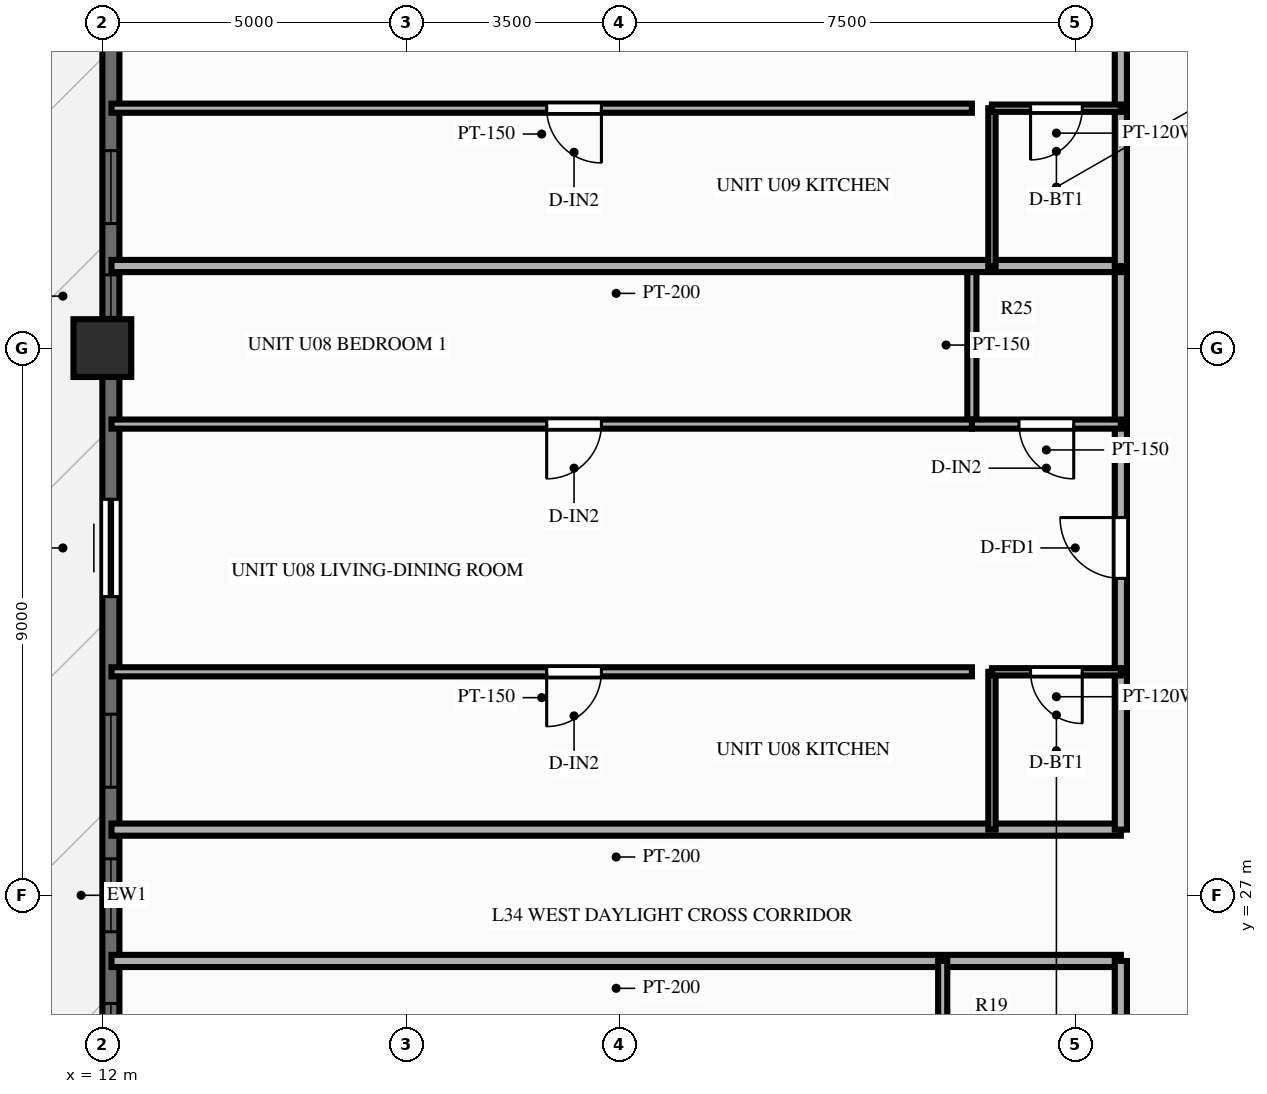
"""IFC4 building model, lengths in metres.
Left out: names, types, materials, properties, quantities, classifications, styles, units other than length and angle.
Written with IfcOpenShell. Run it as: python <this file> out.ifc"""

import sys

from ifc_helpers import new_model, si_unit, direction, frame, frame_2d, origin, origin_2d, place, context, subcontext, project, spatial, rectangle, extrude, source, transform, mapped, element, fill, save


model = new_model("IFC4")
c1 = context("Model", 3, precision=1e-05, world=origin(), true_north=direction((0.0, 1.0)))
c2 = subcontext(c1, "Body", "Model", "MODEL_VIEW")
j1 = project(units=[si_unit("LENGTHUNIT", "METRE"), si_unit("PLANEANGLEUNIT", "RADIAN")], contexts=[c1])
p1 = place(None, origin())
s1 = spatial("IfcSite", under=j1, at=p1, CompositionType="ELEMENT")
p2 = place(p1, origin())
s2 = spatial("IfcBuilding", under=s1, at=p2, CompositionType="ELEMENT")
p3 = place(p2, frame((0.0, 0.0, 107.85)))
s3 = spatial("IfcBuildingStorey", under=s2, at=p3, CompositionType="ELEMENT", Elevation=107.85)
m1 = source(origin(), c2, "Body", "SweptSolid", [
    extrude(rectangle(XDim=0.95, YDim=0.95, at=origin_2d()), origin(), (0.0, 0.0, 1.0), 3.0),
])
p4 = place(p3, frame((12.0, 36.0, 0.0), z_axis=(0.0, 0.0, 1.0), x_axis=(1.0, 0.0, 0.0)))
e1 = element("IfcColumn", 1, at=p4, inside=s3, PredefinedType="COLUMN", context=c2, shape_type="MappedRepresentation", body=[
    mapped(m1, transform((0.0, 0.0, 0.0), scale=1.0)),
])
p5 = place(p3, frame((12.14, 7.2, 0.0), z_axis=(0.0, 0.0, 1.0), x_axis=(0.0, 1.0, 0.0)))
e2 = element("IfcWall", 2, at=p5, inside=s3, PredefinedType="SOLIDWALL", context=c2, shape_type="SweptSolid", body=[
    extrude(rectangle(XDim=39.6, YDim=0.28, at=frame_2d((19.8, 0.0))), origin(), (0.0, 0.0, 1.0), 2.28),
])
p6 = place(p5, frame((0.945, 0.0, 0.25)))
e3 = element("IfcOpeningElement", 3, at=p6, cuts=e2, PredefinedType="OPENING", context=c2, shape_type="SweptSolid", body=[
    extrude(rectangle(XDim=1.2, YDim=1.5, at=frame_2d((0.6, 0.75))), frame((0.0, 0.152, 0.0), z_axis=(0.0, -1.0, 0.0), x_axis=(1.0, 0.0, 0.0)), (0.0, 0.0, 1.0), 0.304),
])
p7 = place(p5, frame((4.213, 0.0, 0.25)))
e4 = element("IfcOpeningElement", 4, at=p7, cuts=e2, PredefinedType="OPENING", context=c2, shape_type="SweptSolid", body=[
    extrude(rectangle(XDim=1.2, YDim=1.5, at=frame_2d((0.6, 0.75))), frame((0.0, 0.152, 0.0), z_axis=(0.0, -1.0, 0.0), x_axis=(1.0, 0.0, 0.0)), (0.0, 0.0, 1.0), 0.304),
])
p8 = place(p5, frame((7.55, 0.0, 0.25)))
e5 = element("IfcOpeningElement", 5, at=p8, cuts=e2, PredefinedType="OPENING", context=c2, shape_type="SweptSolid", body=[
    extrude(rectangle(XDim=1.2, YDim=1.5, at=frame_2d((0.6, 0.75))), frame((0.0, 0.152, 0.0), z_axis=(0.0, -1.0, 0.0), x_axis=(1.0, 0.0, 0.0)), (0.0, 0.0, 1.0), 0.304),
])
p9 = place(p5, frame((13.483, 0.0, 0.25)))
e6 = element("IfcOpeningElement", 6, at=p9, cuts=e2, PredefinedType="OPENING", context=c2, shape_type="SweptSolid", body=[
    extrude(rectangle(XDim=1.2, YDim=1.5, at=frame_2d((0.6, 0.75))), frame((0.0, 0.152, 0.0), z_axis=(0.0, -1.0, 0.0), x_axis=(1.0, 0.0, 0.0)), (0.0, 0.0, 1.0), 0.304),
])
p10 = place(p5, frame((16.82, 0.0, 0.25)))
e7 = element("IfcOpeningElement", 7, at=p10, cuts=e2, PredefinedType="OPENING", context=c2, shape_type="SweptSolid", body=[
    extrude(rectangle(XDim=1.2, YDim=1.5, at=frame_2d((0.6, 0.75))), frame((0.0, 0.152, 0.0), z_axis=(0.0, -1.0, 0.0), x_axis=(1.0, 0.0, 0.0)), (0.0, 0.0, 1.0), 0.304),
])
p11 = place(p5, frame((19.2, 0.0, 0.25)))
e8 = element("IfcOpeningElement", 8, at=p11, cuts=e2, PredefinedType="OPENING", context=c2, shape_type="SweptSolid", body=[
    extrude(rectangle(XDim=1.2, YDim=1.5, at=frame_2d((0.6, 0.75))), frame((0.0, 0.152, 0.0), z_axis=(0.0, -1.0, 0.0), x_axis=(1.0, 0.0, 0.0)), (0.0, 0.0, 1.0), 0.304),
])
p12 = place(p5, frame((21.578, 0.0, 0.25)))
e9 = element("IfcOpeningElement", 9, at=p12, cuts=e2, PredefinedType="OPENING", context=c2, shape_type="SweptSolid", body=[
    extrude(rectangle(XDim=1.2, YDim=1.5, at=frame_2d((0.6, 0.75))), frame((0.0, 0.152, 0.0), z_axis=(0.0, -1.0, 0.0), x_axis=(1.0, 0.0, 0.0)), (0.0, 0.0, 1.0), 0.304),
])
p13 = place(p5, frame((24.713, 0.0, 0.0)))
e10 = element("IfcOpeningElement", 10, at=p13, cuts=e2, PredefinedType="OPENING", context=c2, shape_type="SweptSolid", body=[
    extrude(rectangle(XDim=1.6, YDim=2.15, at=frame_2d((0.8, 1.075))), frame((0.0, 0.152, 0.0), z_axis=(0.0, -1.0, 0.0), x_axis=(1.0, 0.0, 0.0)), (0.0, 0.0, 1.0), 0.304),
])
p14 = place(p5, frame((29.305, 0.0, 0.25)))
e11 = element("IfcOpeningElement", 11, at=p14, cuts=e2, PredefinedType="OPENING", context=c2, shape_type="SweptSolid", body=[
    extrude(rectangle(XDim=0.7, YDim=1.5, at=frame_2d((0.35, 0.75))), frame((0.0, 0.152, 0.0), z_axis=(0.0, -1.0, 0.0), x_axis=(1.0, 0.0, 0.0)), (0.0, 0.0, 1.0), 0.304),
])
p15 = place(p5, frame((30.848, 0.0, 0.25)))
e12 = element("IfcOpeningElement", 12, at=p15, cuts=e2, PredefinedType="OPENING", context=c2, shape_type="SweptSolid", body=[
    extrude(rectangle(XDim=1.2, YDim=1.5, at=frame_2d((0.6, 0.75))), frame((0.0, 0.152, 0.0), z_axis=(0.0, -1.0, 0.0), x_axis=(1.0, 0.0, 0.0)), (0.0, 0.0, 1.0), 0.304),
])
p16 = place(p5, frame((34.183, 0.0, 0.25)))
e13 = element("IfcOpeningElement", 13, at=p16, cuts=e2, PredefinedType="OPENING", context=c2, shape_type="SweptSolid", body=[
    extrude(rectangle(XDim=1.2, YDim=1.5, at=frame_2d((0.6, 0.75))), frame((0.0, 0.152, 0.0), z_axis=(0.0, -1.0, 0.0), x_axis=(1.0, 0.0, 0.0)), (0.0, 0.0, 1.0), 0.304),
])
p17 = place(p5, frame((37.452, 0.0, 0.25)))
e14 = element("IfcOpeningElement", 14, at=p17, cuts=e2, PredefinedType="OPENING", context=c2, shape_type="SweptSolid", body=[
    extrude(rectangle(XDim=1.2, YDim=1.5, at=frame_2d((0.6, 0.75))), frame((0.0, 0.152, 0.0), z_axis=(0.0, -1.0, 0.0), x_axis=(1.0, 0.0, 0.0)), (0.0, 0.0, 1.0), 0.304),
])
p18 = place(p3, frame((28.75, 25.92, 0.0), z_axis=(0.0, 0.0, 1.0), x_axis=(-1.0, 0.0, 0.0)))
e15 = element("IfcWall", 15, at=p18, inside=s3, PredefinedType="PARTITIONING", context=c2, shape_type="SweptSolid", body=[
    extrude(rectangle(XDim=16.6, YDim=0.2, at=frame_2d((8.3, 0.0))), origin(), (0.0, 0.0, 1.0), 2.79),
])
p19 = place(p3, frame((28.75, 23.32, 0.0), z_axis=(0.0, 0.0, 1.0), x_axis=(0.0, 1.0, 0.0)))
e16 = element("IfcWall", 16, at=p19, inside=s3, PredefinedType="PARTITIONING", context=c2, shape_type="SweptSolid", body=[
    extrude(rectangle(XDim=2.6, YDim=0.2, at=frame_2d((1.3, 0.0))), origin(), (0.0, 0.0, 1.0), 2.79),
])
p20 = place(p3, frame((25.82, 23.32, 0.0), z_axis=(0.0, 0.0, 1.0), x_axis=(0.0, 1.0, 0.0)))
e17 = element("IfcWall", 17, at=p20, inside=s3, PredefinedType="PARTITIONING", context=c2, shape_type="SweptSolid", body=[
    extrude(rectangle(XDim=2.6, YDim=0.15, at=frame_2d((1.3, 0.0))), origin(), (0.0, 0.0, 1.0), 2.79),
])
p21 = place(p3, frame((28.75, 28.08, 0.0), z_axis=(0.0, 0.0, 1.0), x_axis=(-1.0, 0.0, 0.0)))
e18 = element("IfcWall", 18, at=p21, inside=s3, PredefinedType="PARTITIONING", context=c2, shape_type="SweptSolid", body=[
    extrude(rectangle(XDim=16.6, YDim=0.2, at=frame_2d((8.3, 0.0))), origin(), (0.0, 0.0, 1.0), 2.79),
])
p22 = place(p3, frame((28.75, 28.08, 0.0), z_axis=(0.0, 0.0, 1.0), x_axis=(0.0, 1.0, 0.0)))
e19 = element("IfcWall", 19, at=p22, inside=s3, PredefinedType="PARTITIONING", context=c2, shape_type="SweptSolid", body=[
    extrude(rectangle(XDim=2.595, YDim=0.2, at=frame_2d((1.298, 0.0))), origin(), (0.0, 0.0, 1.0), 2.79),
])
p23 = place(p3, frame((28.75, 30.676, 0.0), z_axis=(0.0, 0.0, 1.0), x_axis=(0.0, 1.0, 0.0)))
e20 = element("IfcWall", 20, at=p23, inside=s3, PredefinedType="PARTITIONING", context=c2, shape_type="SweptSolid", body=[
    extrude(rectangle(XDim=4.074, YDim=0.2, at=frame_2d((2.037, 0.0))), origin(), (0.0, 0.0, 1.0), 2.79),
])
p24 = place(p23, frame((1.537, 0.0, 0.0)))
e21 = element("IfcOpeningElement", 21, at=p24, cuts=e20, PredefinedType="OPENING", context=c2, shape_type="SweptSolid", body=[
    extrude(rectangle(XDim=1.0, YDim=2.15, at=frame_2d((0.5, 1.075))), frame((0.0, 0.112, 0.0), z_axis=(0.0, -1.0, 0.0), x_axis=(1.0, 0.0, 0.0)), (0.0, 0.0, 1.0), 0.224),
])
p25 = place(p3, frame((28.75, 34.75, 0.0), z_axis=(0.0, 0.0, 1.0), x_axis=(0.0, 1.0, 0.0)))
e22 = element("IfcWall", 22, at=p25, inside=s3, PredefinedType="PARTITIONING", context=c2, shape_type="SweptSolid", body=[
    extrude(rectangle(XDim=2.6, YDim=0.2, at=frame_2d((1.3, 0.0))), origin(), (0.0, 0.0, 1.0), 2.79),
])
p26 = place(p3, frame((26.63, 28.08, 0.0), z_axis=(0.0, 0.0, 1.0), x_axis=(0.0, 1.0, 0.0)))
e23 = element("IfcWall", 23, at=p26, inside=s3, PredefinedType="PARTITIONING", context=c2, shape_type="SweptSolid", body=[
    extrude(rectangle(XDim=2.595, YDim=0.12, at=frame_2d((1.298, 0.0))), origin(), (0.0, 0.0, 1.0), 2.79),
])
p27 = place(p3, frame((26.3, 34.75, 0.0), z_axis=(0.0, 0.0, 1.0), x_axis=(0.0, 1.0, 0.0)))
e24 = element("IfcWall", 24, at=p27, inside=s3, PredefinedType="PARTITIONING", context=c2, shape_type="SweptSolid", body=[
    extrude(rectangle(XDim=2.6, YDim=0.15, at=frame_2d((1.3, 0.0))), origin(), (0.0, 0.0, 1.0), 2.79),
])
p28 = place(p3, frame((28.75, 30.676, 0.0), z_axis=(0.0, 0.0, 1.0), x_axis=(-1.0, 0.0, 0.0)))
e25 = element("IfcWall", 25, at=p28, inside=s3, PredefinedType="PARTITIONING", context=c2, shape_type="SweptSolid", body=[
    extrude(rectangle(XDim=2.12, YDim=0.12, at=frame_2d((1.06, 0.0))), origin(), (0.0, 0.0, 1.0), 2.79),
])
p29 = place(p28, frame((0.635, 0.0, 0.0)))
e26 = element("IfcOpeningElement", 26, at=p29, cuts=e25, PredefinedType="OPENING", context=c2, shape_type="SweptSolid", body=[
    extrude(rectangle(XDim=0.85, YDim=2.05, at=frame_2d((0.425, 1.025))), frame((0.0, 0.072, 0.0), z_axis=(0.0, -1.0, 0.0), x_axis=(1.0, 0.0, 0.0)), (0.0, 0.0, 1.0), 0.144),
])
p30 = place(p3, frame((26.3, 30.676, 0.0), z_axis=(0.0, 0.0, 1.0), x_axis=(-1.0, 0.0, 0.0)))
e27 = element("IfcWall", 27, at=p30, inside=s3, PredefinedType="PARTITIONING", context=c2, shape_type="SweptSolid", body=[
    extrude(rectangle(XDim=14.15, YDim=0.15, at=frame_2d((7.075, 0.0))), origin(), (0.0, 0.0, 1.0), 2.79),
])
p31 = place(p30, frame((6.093, 0.0, 0.0)))
e28 = element("IfcOpeningElement", 28, at=p31, cuts=e27, PredefinedType="OPENING", context=c2, shape_type="SweptSolid", body=[
    extrude(rectangle(XDim=0.9, YDim=2.1, at=frame_2d((0.45, 1.05))), frame((0.0, 0.087, 0.0), z_axis=(0.0, -1.0, 0.0), x_axis=(1.0, 0.0, 0.0)), (0.0, 0.0, 1.0), 0.174),
])
p32 = place(p3, frame((28.75, 34.75, 0.0), z_axis=(0.0, 0.0, 1.0), x_axis=(-1.0, 0.0, 0.0)))
e29 = element("IfcWall", 29, at=p32, inside=s3, PredefinedType="PARTITIONING", context=c2, shape_type="SweptSolid", body=[
    extrude(rectangle(XDim=2.45, YDim=0.15, at=frame_2d((1.225, 0.0))), origin(), (0.0, 0.0, 1.0), 2.79),
])
p33 = place(p32, frame((0.775, 0.0, 0.0)))
e30 = element("IfcOpeningElement", 30, at=p33, cuts=e29, PredefinedType="OPENING", context=c2, shape_type="SweptSolid", body=[
    extrude(rectangle(XDim=0.9, YDim=2.1, at=frame_2d((0.45, 1.05))), frame((0.0, 0.087, 0.0), z_axis=(0.0, -1.0, 0.0), x_axis=(1.0, 0.0, 0.0)), (0.0, 0.0, 1.0), 0.174),
])
p34 = place(p3, frame((26.3, 34.75, 0.0), z_axis=(0.0, 0.0, 1.0), x_axis=(-1.0, 0.0, 0.0)))
e31 = element("IfcWall", 31, at=p34, inside=s3, PredefinedType="PARTITIONING", context=c2, shape_type="SweptSolid", body=[
    extrude(rectangle(XDim=14.15, YDim=0.15, at=frame_2d((7.075, 0.0))), origin(), (0.0, 0.0, 1.0), 2.79),
])
p35 = place(p34, frame((6.093, 0.0, 0.0)))
e32 = element("IfcOpeningElement", 32, at=p35, cuts=e31, PredefinedType="OPENING", context=c2, shape_type="SweptSolid", body=[
    extrude(rectangle(XDim=0.9, YDim=2.1, at=frame_2d((0.45, 1.05))), frame((0.0, 0.087, 0.0), z_axis=(0.0, -1.0, 0.0), x_axis=(1.0, 0.0, 0.0)), (0.0, 0.0, 1.0), 0.174),
])
p36 = place(p3, frame((28.75, 37.35, 0.0), z_axis=(0.0, 0.0, 1.0), x_axis=(-1.0, 0.0, 0.0)))
e33 = element("IfcWall", 33, at=p36, inside=s3, PredefinedType="PARTITIONING", context=c2, shape_type="SweptSolid", body=[
    extrude(rectangle(XDim=16.6, YDim=0.2, at=frame_2d((8.3, 0.0))), origin(), (0.0, 0.0, 1.0), 2.79),
])
p37 = place(p3, frame((28.75, 37.35, 0.0), z_axis=(0.0, 0.0, 1.0), x_axis=(0.0, 1.0, 0.0)))
e34 = element("IfcWall", 34, at=p37, inside=s3, PredefinedType="PARTITIONING", context=c2, shape_type="SweptSolid", body=[
    extrude(rectangle(XDim=2.595, YDim=0.2, at=frame_2d((1.298, 0.0))), origin(), (0.0, 0.0, 1.0), 2.79),
])
p38 = place(p3, frame((28.75, 39.946, 0.0), z_axis=(0.0, 0.0, 1.0), x_axis=(0.0, 1.0, 0.0)))
e35 = element("IfcWall", 35, at=p38, inside=s3, PredefinedType="PARTITIONING", context=c2, shape_type="SweptSolid", body=[
    extrude(rectangle(XDim=4.074, YDim=0.2, at=frame_2d((2.037, 0.0))), origin(), (0.0, 0.0, 1.0), 2.79),
])
p39 = place(p38, frame((1.537, 0.0, 0.0)))
e36 = element("IfcOpeningElement", 36, at=p39, cuts=e35, PredefinedType="OPENING", context=c2, shape_type="SweptSolid", body=[
    extrude(rectangle(XDim=1.0, YDim=2.15, at=frame_2d((0.5, 1.075))), frame((0.0, 0.112, 0.0), z_axis=(0.0, -1.0, 0.0), x_axis=(1.0, 0.0, 0.0)), (0.0, 0.0, 1.0), 0.224),
])
p40 = place(p3, frame((26.63, 37.35, 0.0), z_axis=(0.0, 0.0, 1.0), x_axis=(0.0, 1.0, 0.0)))
e37 = element("IfcWall", 37, at=p40, inside=s3, PredefinedType="PARTITIONING", context=c2, shape_type="SweptSolid", body=[
    extrude(rectangle(XDim=2.595, YDim=0.12, at=frame_2d((1.298, 0.0))), origin(), (0.0, 0.0, 1.0), 2.79),
])
p41 = place(p3, frame((28.75, 39.946, 0.0), z_axis=(0.0, 0.0, 1.0), x_axis=(-1.0, 0.0, 0.0)))
e38 = element("IfcWall", 38, at=p41, inside=s3, PredefinedType="PARTITIONING", context=c2, shape_type="SweptSolid", body=[
    extrude(rectangle(XDim=2.12, YDim=0.12, at=frame_2d((1.06, 0.0))), origin(), (0.0, 0.0, 1.0), 2.79),
])
p42 = place(p41, frame((0.635, 0.0, 0.0)))
e39 = element("IfcOpeningElement", 39, at=p42, cuts=e38, PredefinedType="OPENING", context=c2, shape_type="SweptSolid", body=[
    extrude(rectangle(XDim=0.85, YDim=2.05, at=frame_2d((0.425, 1.025))), frame((0.0, 0.072, 0.0), z_axis=(0.0, -1.0, 0.0), x_axis=(1.0, 0.0, 0.0)), (0.0, 0.0, 1.0), 0.144),
])
p43 = place(p3, frame((26.3, 39.946, 0.0), z_axis=(0.0, 0.0, 1.0), x_axis=(-1.0, 0.0, 0.0)))
e40 = element("IfcWall", 40, at=p43, inside=s3, PredefinedType="PARTITIONING", context=c2, shape_type="SweptSolid", body=[
    extrude(rectangle(XDim=14.15, YDim=0.15, at=frame_2d((7.075, 0.0))), origin(), (0.0, 0.0, 1.0), 2.79),
])
p44 = place(p43, frame((6.093, 0.0, 0.0)))
e41 = element("IfcOpeningElement", 41, at=p44, cuts=e40, PredefinedType="OPENING", context=c2, shape_type="SweptSolid", body=[
    extrude(rectangle(XDim=0.9, YDim=2.1, at=frame_2d((0.45, 1.05))), frame((0.0, 0.087, 0.0), z_axis=(0.0, -1.0, 0.0), x_axis=(1.0, 0.0, 0.0)), (0.0, 0.0, 1.0), 0.174),
])
m2 = source(origin(), c2, "Body", "SweptSolid", [
    extrude(rectangle(XDim=1.2, YDim=1.5, at=frame_2d((0.6, 0.75))), frame((0.0, 0.03, 0.0), z_axis=(0.0, -1.0, 0.0), x_axis=(1.0, 0.0, 0.0)), (0.0, 0.0, 1.0), 0.06),
])
p45 = place(p10, origin())
e42 = element("IfcWindow", 42, at=p45, inside=s3, PartitioningType="SINGLE_PANEL", PredefinedType="WINDOW", context=c2, shape_type="MappedRepresentation", body=[
    mapped(m2, transform((0.0, 0.0, 0.0), scale=1.0)),
])
fill(e7, e42)
p46 = place(p11, origin())
e43 = element("IfcWindow", 43, at=p46, inside=s3, PartitioningType="SINGLE_PANEL", PredefinedType="WINDOW", context=c2, shape_type="MappedRepresentation", body=[
    mapped(m2, transform((0.0, 0.0, 0.0), scale=1.0)),
])
fill(e8, e43)
p47 = place(p12, origin())
e44 = element("IfcWindow", 44, at=p47, inside=s3, PartitioningType="SINGLE_PANEL", PredefinedType="WINDOW", context=c2, shape_type="MappedRepresentation", body=[
    mapped(m2, transform((0.0, 0.0, 0.0), scale=1.0)),
])
fill(e9, e44)
m3 = source(origin(), c2, "Body", "SweptSolid", [
    extrude(rectangle(XDim=1.6, YDim=2.15, at=frame_2d((0.8, 1.075))), frame((0.0, 0.025, 0.0), z_axis=(0.0, -1.0, 0.0), x_axis=(1.0, 0.0, 0.0)), (0.0, 0.0, 1.0), 0.05),
])
p48 = place(p13, origin())
e45 = element("IfcDoor", 45, at=p48, inside=s3, OperationType="SLIDING_TO_LEFT", PredefinedType="DOOR", context=c2, shape_type="MappedRepresentation", body=[
    mapped(m3, transform((0.0, 0.0, 0.0), scale=1.0)),
])
fill(e10, e45)
m4 = source(origin(), c2, "Body", "SweptSolid", [
    extrude(rectangle(XDim=0.7, YDim=1.5, at=frame_2d((0.35, 0.75))), frame((0.0, 0.03, 0.0), z_axis=(0.0, -1.0, 0.0), x_axis=(1.0, 0.0, 0.0)), (0.0, 0.0, 1.0), 0.06),
])
p49 = place(p14, origin())
e46 = element("IfcWindow", 46, at=p49, inside=s3, PartitioningType="SINGLE_PANEL", PredefinedType="WINDOW", context=c2, shape_type="MappedRepresentation", body=[
    mapped(m4, transform((0.0, 0.0, 0.0), scale=1.0)),
])
fill(e11, e46)
p50 = place(p15, origin())
e47 = element("IfcWindow", 47, at=p50, inside=s3, PartitioningType="SINGLE_PANEL", PredefinedType="WINDOW", context=c2, shape_type="MappedRepresentation", body=[
    mapped(m2, transform((0.0, 0.0, 0.0), scale=1.0)),
])
fill(e12, e47)
m5 = source(origin(), c2, "Body", "SweptSolid", [
    extrude(rectangle(XDim=1.0, YDim=2.15, at=frame_2d((0.5, 1.075))), frame((0.0, 0.025, 0.0), z_axis=(0.0, -1.0, 0.0), x_axis=(1.0, 0.0, 0.0)), (0.0, 0.0, 1.0), 0.05),
])
p51 = place(p24, origin())
e48 = element("IfcDoor", 48, at=p51, inside=s3, OperationType="SINGLE_SWING_RIGHT", PredefinedType="DOOR", context=c2, shape_type="MappedRepresentation", body=[
    mapped(m5, transform((0.0, 0.0, 0.0), scale=1.0)),
])
fill(e21, e48)
m6 = source(origin(), c2, "Body", "SweptSolid", [
    extrude(rectangle(XDim=0.85, YDim=2.05, at=frame_2d((0.425, 1.025))), frame((0.0, 0.025, 0.0), z_axis=(0.0, -1.0, 0.0), x_axis=(1.0, 0.0, 0.0)), (0.0, 0.0, 1.0), 0.05),
])
p52 = place(p29, origin())
e49 = element("IfcDoor", 49, at=p52, inside=s3, OperationType="SINGLE_SWING_LEFT", PredefinedType="DOOR", context=c2, shape_type="MappedRepresentation", body=[
    mapped(m6, transform((0.0, 0.0, 0.0), scale=1.0)),
])
fill(e26, e49)
m7 = source(origin(), c2, "Body", "SweptSolid", [
    extrude(rectangle(XDim=0.9, YDim=2.1, at=frame_2d((0.45, 1.05))), frame((0.0, 0.025, 0.0), z_axis=(0.0, -1.0, 0.0), x_axis=(1.0, 0.0, 0.0)), (0.0, 0.0, 1.0), 0.05),
])
p53 = place(p31, origin())
e50 = element("IfcDoor", 50, at=p53, inside=s3, OperationType="SINGLE_SWING_RIGHT", PredefinedType="DOOR", context=c2, shape_type="MappedRepresentation", body=[
    mapped(m7, transform((0.0, 0.0, 0.0), scale=1.0)),
])
fill(e28, e50)
p54 = place(p33, origin())
e51 = element("IfcDoor", 51, at=p54, inside=s3, OperationType="SINGLE_SWING_LEFT", PredefinedType="DOOR", context=c2, shape_type="MappedRepresentation", body=[
    mapped(m7, transform((0.0, 0.0, 0.0), scale=1.0)),
])
fill(e30, e51)
p55 = place(p35, origin())
e52 = element("IfcDoor", 52, at=p55, inside=s3, OperationType="SINGLE_SWING_RIGHT", PredefinedType="DOOR", context=c2, shape_type="MappedRepresentation", body=[
    mapped(m7, transform((0.0, 0.0, 0.0), scale=1.0)),
])
fill(e32, e52)
p56 = place(p42, origin())
e53 = element("IfcDoor", 53, at=p56, inside=s3, OperationType="SINGLE_SWING_RIGHT", PredefinedType="DOOR", context=c2, shape_type="MappedRepresentation", body=[
    mapped(m6, transform((0.0, 0.0, 0.0), scale=1.0)),
])
fill(e39, e53)
p57 = place(p44, origin())
e54 = element("IfcDoor", 54, at=p57, inside=s3, OperationType="SINGLE_SWING_LEFT", PredefinedType="DOOR", context=c2, shape_type="MappedRepresentation", body=[
    mapped(m7, transform((0.0, 0.0, 0.0), scale=1.0)),
])
fill(e41, e54)
save(model, sys.argv[1])
